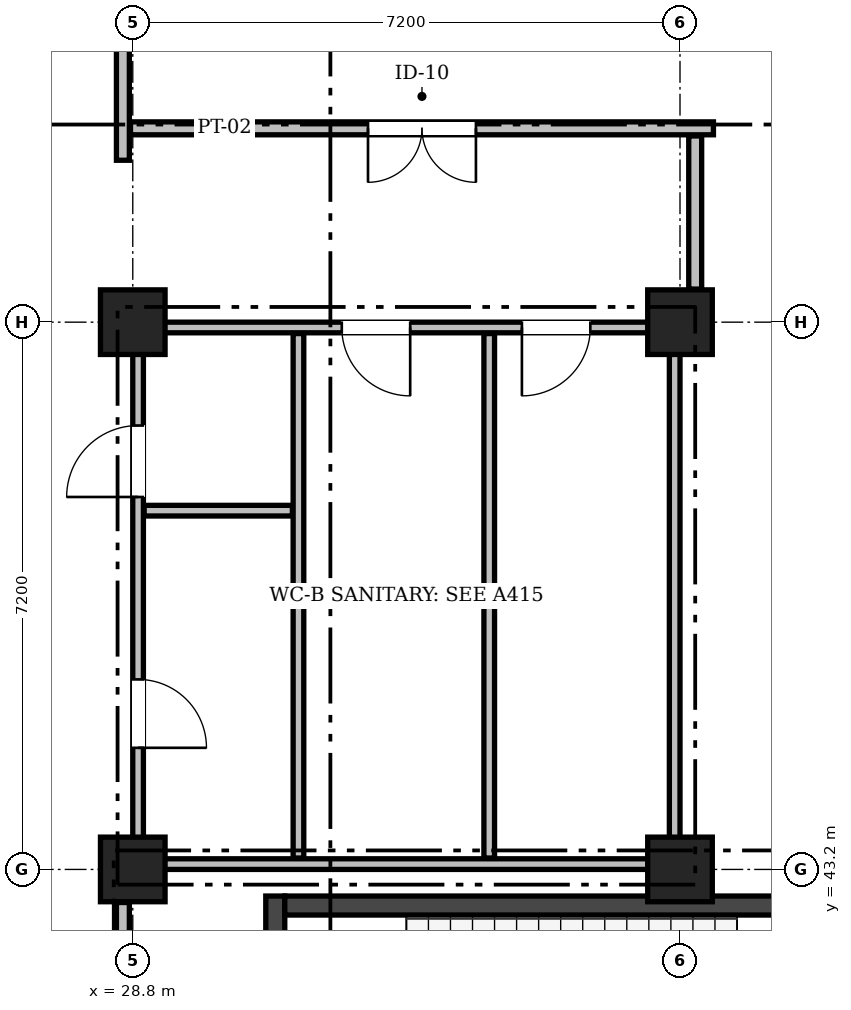
"""IFC4 building model, lengths in metres.
Left out: names, types, materials, properties, quantities, classifications, styles, units other than length and angle.
Written with IfcOpenShell. Run it as: python <this file> out.ifc"""

import sys

from ifc_helpers import new_model, si_unit, direction, frame, frame_2d, origin, origin_2d, place, context, subcontext, project, spatial, rectangle, extrude, element, fill, save


model = new_model("IFC4")
c1 = context("Model", 3, precision=1e-05, world=origin(), true_north=direction((0.0, 1.0)))
c2 = subcontext(c1, "Body", "Model", "MODEL_VIEW")
j1 = project(units=[si_unit("LENGTHUNIT", "METRE"), si_unit("PLANEANGLEUNIT", "RADIAN")], contexts=[c1])
p1 = place(None, origin())
s1 = spatial("IfcSite", under=j1, at=p1, CompositionType="ELEMENT")
p2 = place(p1, origin())
s2 = spatial("IfcBuilding", under=s1, at=p2, CompositionType="ELEMENT")
p3 = place(p2, frame((0.0, 0.0, 4.8)))
s3 = spatial("IfcBuildingStorey", under=s2, at=p3, CompositionType="ELEMENT", Elevation=4.8)
for number, where, z_axis, x_axis in (
    (1, (28.8, 43.2, 0.0), (0.0, 0.0, 1.0), (1.0, 0.0, 0.0)),
    (2, (28.8, 50.4, 0.0), (0.0, 0.0, 1.0), (1.0, 0.0, 0.0)),
    (3, (36.0, 43.2, 0.0), (0.0, 0.0, 1.0), (1.0, 0.0, 0.0)),
    (4, (36.0, 50.4, 0.0), (0.0, 0.0, 1.0), (1.0, 0.0, 0.0)),
):
    element("IfcColumn", number, at=place(p3, frame(where, z_axis=z_axis, x_axis=x_axis)), inside=s3, PredefinedType="COLUMN", context=c2, shape_type="SweptSolid", body=[
        extrude(rectangle(XDim=0.85, YDim=0.85, at=origin_2d()), origin(), (0.0, 0.0, 1.0), 4.8),
    ])
p4 = place(p3, frame((30.675, 39.15, 0.0), z_axis=(0.0, 0.0, 1.0), x_axis=(0.0, 1.0, 0.0)))
e5 = element("IfcWall", 5, at=p4, inside=s3, PredefinedType="SHEAR", context=c2, shape_type="SweptSolid", body=[
    extrude(rectangle(XDim=3.7, YDim=0.25, at=frame_2d((1.85, 0.0))), origin(), (0.0, 0.0, 1.0), 4.55),
])
p5 = place(p4, frame((1.25, 0.0, 0.0)))
e6 = element("IfcOpeningElement", 6, at=p5, cuts=e5, PredefinedType="OPENING", context=c2, shape_type="SweptSolid", body=[
    extrude(rectangle(XDim=1.2, YDim=2.15, at=frame_2d((0.6, 1.075))), frame((0.0, 0.137, 0.0), z_axis=(0.0, -1.0, 0.0), x_axis=(1.0, 0.0, 0.0)), (0.0, 0.0, 1.0), 0.274),
])
p6 = place(p3, frame((30.8, 42.725, 0.0), z_axis=(0.0, 0.0, 1.0), x_axis=(1.0, 0.0, 0.0)))
e7 = element("IfcWall", 7, at=p6, inside=s3, PredefinedType="SHEAR", context=c2, shape_type="SweptSolid", body=[
    extrude(rectangle(XDim=7.6, YDim=0.25, at=frame_2d((3.8, 0.0))), origin(), (0.0, 0.0, 1.0), 4.55),
])
p7 = place(p3, frame((28.87, 43.27, 0.0), z_axis=(0.0, 0.0, 1.0), x_axis=(1.0, 0.0, 0.0)))
e8 = element("IfcWall", 8, at=p7, inside=s3, PredefinedType="PARTITIONING", context=c2, shape_type="SweptSolid", body=[
    extrude(rectangle(XDim=7.06, YDim=0.14, at=frame_2d((3.53, 0.0))), origin(), (0.0, 0.0, 1.0), 3.9),
])
p8 = place(p3, frame((28.87, 50.33, 0.0), z_axis=(0.0, 0.0, 1.0), x_axis=(1.0, 0.0, 0.0)))
e9 = element("IfcWall", 9, at=p8, inside=s3, PredefinedType="PARTITIONING", context=c2, shape_type="SweptSolid", body=[
    extrude(rectangle(XDim=7.06, YDim=0.14, at=frame_2d((3.53, 0.0))), origin(), (0.0, 0.0, 1.0), 3.9),
])
p9 = place(p8, frame((2.68, 0.0, 0.0)))
e10 = element("IfcOpeningElement", 10, at=p9, cuts=e9, PredefinedType="OPENING", context=c2, shape_type="SweptSolid", body=[
    extrude(rectangle(XDim=0.9, YDim=2.08, at=frame_2d((0.45, 1.04))), frame((0.0, 0.082, 0.0), z_axis=(0.0, -1.0, 0.0), x_axis=(1.0, 0.0, 0.0)), (0.0, 0.0, 1.0), 0.164),
])
p10 = place(p8, frame((5.05, 0.0, 0.0)))
e11 = element("IfcOpeningElement", 11, at=p10, cuts=e9, PredefinedType="OPENING", context=c2, shape_type="SweptSolid", body=[
    extrude(rectangle(XDim=0.9, YDim=2.08, at=frame_2d((0.45, 1.04))), frame((0.0, 0.082, 0.0), z_axis=(0.0, -1.0, 0.0), x_axis=(1.0, 0.0, 0.0)), (0.0, 0.0, 1.0), 0.164),
])
p11 = place(p3, frame((28.87, 43.35, 0.0), z_axis=(0.0, 0.0, 1.0), x_axis=(0.0, 1.0, 0.0)))
e12 = element("IfcWall", 12, at=p11, inside=s3, PredefinedType="PARTITIONING", context=c2, shape_type="SweptSolid", body=[
    extrude(rectangle(XDim=6.9, YDim=0.14, at=frame_2d((3.45, 0.0))), origin(), (0.0, 0.0, 1.0), 4.08),
])
p12 = place(p11, frame((1.45, 0.0, 0.0)))
e13 = element("IfcOpeningElement", 13, at=p12, cuts=e12, PredefinedType="OPENING", context=c2, shape_type="SweptSolid", body=[
    extrude(rectangle(XDim=0.9, YDim=2.08, at=frame_2d((0.45, 1.04))), frame((0.0, 0.082, 0.0), z_axis=(0.0, -1.0, 0.0), x_axis=(1.0, 0.0, 0.0)), (0.0, 0.0, 1.0), 0.164),
])
p13 = place(p11, frame((4.75, 0.0, 0.0)))
e14 = element("IfcOpeningElement", 14, at=p13, cuts=e12, PredefinedType="OPENING", context=c2, shape_type="SweptSolid", body=[
    extrude(rectangle(XDim=0.94, YDim=2.1, at=frame_2d((0.47, 1.05))), frame((0.0, 0.082, 0.0), z_axis=(0.0, -1.0, 0.0), x_axis=(1.0, 0.0, 0.0)), (0.0, 0.0, 1.0), 0.164),
])
p14 = place(p3, frame((35.93, 43.35, 0.0), z_axis=(0.0, 0.0, 1.0), x_axis=(0.0, 1.0, 0.0)))
e15 = element("IfcWall", 15, at=p14, inside=s3, PredefinedType="PARTITIONING", context=c2, shape_type="SweptSolid", body=[
    extrude(rectangle(XDim=6.9, YDim=0.14, at=frame_2d((3.45, 0.0))), origin(), (0.0, 0.0, 1.0), 4.08),
])
for number, where, z_axis, x_axis in (
    (16, (30.98, 43.35, 0.0), (0.0, 0.0, 1.0), (0.0, 1.0, 0.0)),
    (17, (33.49, 43.35, 0.0), (0.0, 0.0, 1.0), (0.0, 1.0, 0.0)),
):
    element("IfcWall", number, at=place(p3, frame(where, z_axis=z_axis, x_axis=x_axis)), inside=s3, PredefinedType="PARTITIONING", context=c2, shape_type="SweptSolid", body=[
        extrude(rectangle(XDim=6.9, YDim=0.14, at=frame_2d((3.45, 0.0))), origin(), (0.0, 0.0, 1.0), 4.46),
    ])
p15 = place(p3, frame((28.95, 47.92, 0.0), z_axis=(0.0, 0.0, 1.0), x_axis=(1.0, 0.0, 0.0)))
e18 = element("IfcWall", 18, at=p15, inside=s3, PredefinedType="PARTITIONING", context=c2, shape_type="SweptSolid", body=[
    extrude(rectangle(XDim=1.95, YDim=0.14, at=frame_2d((0.975, 0.0))), origin(), (0.0, 0.0, 1.0), 4.46),
])
p16 = place(p3, frame((28.67, 52.53, 0.0), z_axis=(0.0, 0.0, 1.0), x_axis=(0.0, 1.0, 0.0)))
e19 = element("IfcWall", 19, at=p16, inside=s3, PredefinedType="PARTITIONING", context=c2, shape_type="SweptSolid", body=[
    extrude(rectangle(XDim=4.635, YDim=0.17, at=frame_2d((2.317, 0.0))), origin(), (0.0, 0.0, 1.0), 4.08),
])
p17 = place(p3, frame((28.67, 40.77, 0.0), z_axis=(0.0, 0.0, 1.0), x_axis=(0.0, 1.0, 0.0)))
e20 = element("IfcWall", 20, at=p17, inside=s3, PredefinedType="PARTITIONING", context=c2, shape_type="SweptSolid", body=[
    extrude(rectangle(XDim=1.995, YDim=0.17, at=frame_2d((0.998, 0.0))), origin(), (0.0, 0.0, 1.0), 4.08),
])
p18 = place(p3, frame((28.77, 52.95, 0.0), z_axis=(0.0, 0.0, 1.0), x_axis=(1.0, 0.0, 0.0)))
e21 = element("IfcWall", 21, at=p18, inside=s3, PredefinedType="PARTITIONING", context=c2, shape_type="SweptSolid", body=[
    extrude(rectangle(XDim=7.67, YDim=0.17, at=frame_2d((3.835, 0.0))), origin(), (0.0, 0.0, 1.0), 4.46),
])
p19 = place(p18, frame((3.125, 0.0, 0.0)))
e22 = element("IfcOpeningElement", 22, at=p19, cuts=e21, PredefinedType="OPENING", context=c2, shape_type="SweptSolid", body=[
    extrude(rectangle(XDim=1.42, YDim=2.24, at=frame_2d((0.71, 1.12))), frame((0.0, 0.097, 0.0), z_axis=(0.0, -1.0, 0.0), x_axis=(1.0, 0.0, 0.0)), (0.0, 0.0, 1.0), 0.194),
])
p20 = place(p3, frame((36.2, 50.835, 0.0), z_axis=(0.0, 0.0, 1.0), x_axis=(0.0, 1.0, 0.0)))
e23 = element("IfcWall", 23, at=p20, inside=s3, PredefinedType="PARTITIONING", context=c2, shape_type="SweptSolid", body=[
    extrude(rectangle(XDim=2.015, YDim=0.17, at=frame_2d((1.008, 0.0))), origin(), (0.0, 0.0, 1.0), 4.08),
])
p21 = place(p12, frame((0.9, 0.0, 0.0), z_axis=(0.0, 0.0, 1.0), x_axis=(-1.0, 0.0, 0.0)))
e24 = element("IfcDoor", 24, at=p21, inside=s3, OperationType="SINGLE_SWING_RIGHT", PredefinedType="DOOR", context=c2, shape_type="SweptSolid", body=[
    extrude(rectangle(XDim=0.9, YDim=2.08, at=frame_2d((0.45, 1.04))), frame((0.0, 0.025, 0.0), z_axis=(0.0, -1.0, 0.0), x_axis=(1.0, 0.0, 0.0)), (0.0, 0.0, 1.0), 0.05),
])
fill(e13, e24)
p22 = place(p13, origin())
e25 = element("IfcDoor", 25, at=p22, inside=s3, OperationType="SINGLE_SWING_LEFT", PredefinedType="DOOR", context=c2, shape_type="SweptSolid", body=[
    extrude(rectangle(XDim=0.94, YDim=2.1, at=frame_2d((0.47, 1.05))), frame((0.0, 0.025, 0.0), z_axis=(0.0, -1.0, 0.0), x_axis=(1.0, 0.0, 0.0)), (0.0, 0.0, 1.0), 0.05),
])
fill(e14, e25)
p23 = place(p9, frame((0.9, 0.0, 0.0), z_axis=(0.0, 0.0, 1.0), x_axis=(-1.0, 0.0, 0.0)))
e26 = element("IfcDoor", 26, at=p23, inside=s3, OperationType="SINGLE_SWING_LEFT", PredefinedType="DOOR", context=c2, shape_type="SweptSolid", body=[
    extrude(rectangle(XDim=0.9, YDim=2.08, at=frame_2d((0.45, 1.04))), frame((0.0, 0.025, 0.0), z_axis=(0.0, -1.0, 0.0), x_axis=(1.0, 0.0, 0.0)), (0.0, 0.0, 1.0), 0.05),
])
fill(e10, e26)
p24 = place(p10, frame((0.9, 0.0, 0.0), z_axis=(0.0, 0.0, 1.0), x_axis=(-1.0, 0.0, 0.0)))
e27 = element("IfcDoor", 27, at=p24, inside=s3, OperationType="SINGLE_SWING_RIGHT", PredefinedType="DOOR", context=c2, shape_type="SweptSolid", body=[
    extrude(rectangle(XDim=0.9, YDim=2.08, at=frame_2d((0.45, 1.04))), frame((0.0, 0.025, 0.0), z_axis=(0.0, -1.0, 0.0), x_axis=(1.0, 0.0, 0.0)), (0.0, 0.0, 1.0), 0.05),
])
fill(e11, e27)
p25 = place(p19, frame((1.42, 0.0, 0.0), z_axis=(0.0, 0.0, 1.0), x_axis=(-1.0, 0.0, 0.0)))
e28 = element("IfcDoor", 28, at=p25, inside=s3, OperationType="DOUBLE_DOOR_SINGLE_SWING", PredefinedType="DOOR", context=c2, shape_type="SweptSolid", body=[
    extrude(rectangle(XDim=1.42, YDim=2.24, at=frame_2d((0.71, 1.12))), frame((0.0, 0.025, 0.0), z_axis=(0.0, -1.0, 0.0), x_axis=(1.0, 0.0, 0.0)), (0.0, 0.0, 1.0), 0.05),
])
fill(e22, e28)
save(model, sys.argv[1])
